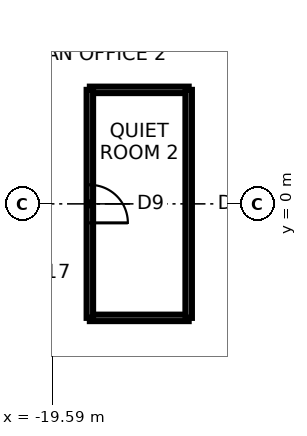
"""IFC4 building model, lengths in metres.
Left out: names, types, materials, properties, quantities, classifications, styles, units other than length and angle.
Written with IfcOpenShell. Run it as: python <this file> out.ifc"""

import sys

from ifc_helpers import new_model, si_unit, direction, frame, frame_2d, origin, place, context, subcontext, project, spatial, rectangle, extrude, element, fill, save


model = new_model("IFC4")
c1 = context("Model", 3, precision=1e-05, world=origin(), true_north=direction((0.0, 1.0)))
c2 = subcontext(c1, "Body", "Model", "MODEL_VIEW")
j1 = project(units=[si_unit("LENGTHUNIT", "METRE"), si_unit("PLANEANGLEUNIT", "RADIAN")], contexts=[c1])
p1 = place(None, origin())
s1 = spatial("IfcSite", under=j1, at=p1, CompositionType="ELEMENT")
p2 = place(p1, origin())
s2 = spatial("IfcBuilding", under=s1, at=p2, CompositionType="ELEMENT")
p3 = place(p2, frame((0.0, 0.0, 211.1)))
s3 = spatial("IfcBuildingStorey", under=s2, at=p3, CompositionType="ELEMENT", Elevation=211.1)
for number, where, z_axis, x_axis in (
    (1, (-16.0, -3.0, 0.0), (0.0, 0.0, 1.0), (-1.0, 0.0, 0.0)),
    (2, (-18.6, 3.0, 0.0), (0.0, 0.0, 1.0), (1.0, 0.0, 0.0)),
):
    element("IfcWall", number, at=place(p3, frame(where, z_axis=z_axis, x_axis=x_axis)), inside=s3, PredefinedType="PARTITIONING", context=c2, shape_type="SweptSolid", body=[
        extrude(rectangle(XDim=2.6, YDim=0.17, at=frame_2d((1.3, 0.0))), origin(), (0.0, 0.0, 1.0), 3.74),
    ])
p4 = place(p3, frame((-18.6, -3.0, 0.0), z_axis=(0.0, 0.0, 1.0), x_axis=(0.0, 1.0, 0.0)))
e3 = element("IfcWall", 3, at=p4, inside=s3, PredefinedType="PARTITIONING", context=c2, shape_type="SweptSolid", body=[
    extrude(rectangle(XDim=6.0, YDim=0.17, at=frame_2d((3.0, 0.0))), origin(), (0.0, 0.0, 1.0), 3.74),
])
p5 = place(p4, frame((2.5, 0.0, 0.0)))
e4 = element("IfcOpeningElement", 4, at=p5, cuts=e3, PredefinedType="OPENING", context=c2, shape_type="SweptSolid", body=[
    extrude(rectangle(XDim=1.0, YDim=2.4, at=frame_2d((0.5, 1.2))), frame((0.0, 0.095, 0.0), z_axis=(0.0, -1.0, 0.0), x_axis=(1.0, 0.0, 0.0)), (0.0, 0.0, 1.0), 0.19),
])
p6 = place(p3, frame((-16.0, 3.0, 0.0), z_axis=(0.0, 0.0, 1.0), x_axis=(0.0, -1.0, 0.0)))
e5 = element("IfcWall", 5, at=p6, inside=s3, PredefinedType="PARTITIONING", context=c2, shape_type="SweptSolid", body=[
    extrude(rectangle(XDim=6.0, YDim=0.17, at=frame_2d((3.0, 0.0))), origin(), (0.0, 0.0, 1.0), 3.74),
])
p7 = place(p5, frame((1.0, 0.0, 0.0), z_axis=(0.0, 0.0, 1.0), x_axis=(-1.0, 0.0, 0.0)))
e6 = element("IfcDoor", 6, at=p7, inside=s3, OperationType="SINGLE_SWING_RIGHT", PredefinedType="DOOR", context=c2, shape_type="SweptSolid", body=[
    extrude(rectangle(XDim=1.0, YDim=2.4, at=frame_2d((0.5, 1.2))), frame((0.0, 0.025, 0.0), z_axis=(0.0, -1.0, 0.0), x_axis=(1.0, 0.0, 0.0)), (0.0, 0.0, 1.0), 0.05),
])
fill(e4, e6)
save(model, sys.argv[1])
